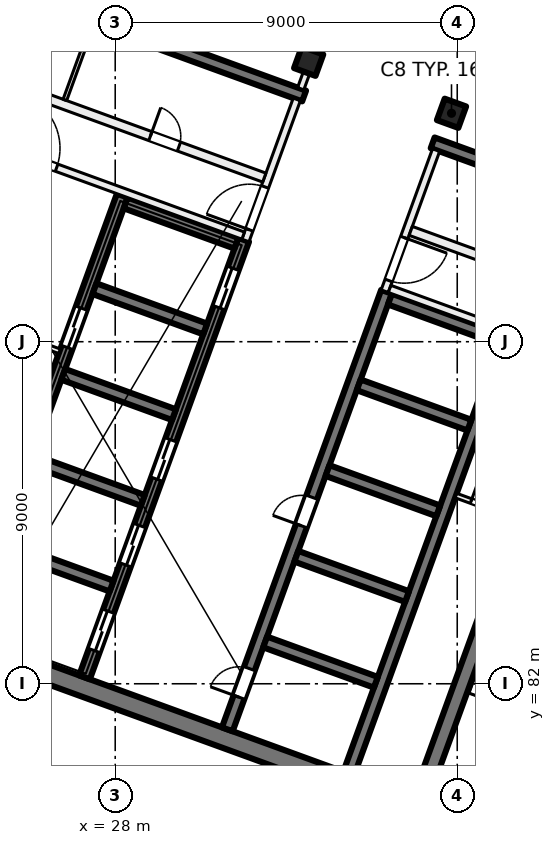
"""IFC4 building model, lengths in metres.
Left out: names, types, materials, properties, quantities, classifications, styles, units other than length and angle.
Written with IfcOpenShell. Run it as: python <this file> out.ifc"""

import sys

from ifc_helpers import new_model, si_unit, direction, frame, frame_2d, origin, origin_2d, place, context, subcontext, project, spatial, rectangle, extrude, element, fill, save


model = new_model("IFC4")
c1 = context("Model", 3, precision=1e-05, world=origin(), true_north=direction((0.0, 1.0)))
c2 = subcontext(c1, "Body", "Model", "MODEL_VIEW")
j1 = project(units=[si_unit("LENGTHUNIT", "METRE"), si_unit("PLANEANGLEUNIT", "RADIAN")], contexts=[c1])
p1 = place(None, origin())
s1 = spatial("IfcSite", under=j1, at=p1, CompositionType="ELEMENT")
p2 = place(p1, origin())
s2 = spatial("IfcBuilding", under=s1, at=p2, CompositionType="ELEMENT")
p3 = place(p2, frame((0.0, 0.0, 200.0)))
s3 = spatial("IfcBuildingStorey", under=s2, at=p3, CompositionType="ELEMENT", Elevation=200.0)
for number, where, z_axis, x_axis in (
    (1, (36.849, 97.011, 0.0), (0.0, 0.0, 1.0), (-0.342, -0.94, 0.0)),
    (2, (33.091, 98.379, 0.0), (0.0, 0.0, 1.0), (-0.342, -0.94, 0.0)),
):
    element("IfcColumn", number, at=place(p3, frame(where, z_axis=z_axis, x_axis=x_axis)), inside=s3, PredefinedType="COLUMN", context=c2, shape_type="SweptSolid", body=[
        extrude(rectangle(XDim=0.6, YDim=0.6, at=origin_2d()), origin(), (0.0, 0.0, 1.0), 4.0),
    ])
p4 = place(p3, frame((35.75, 78.788, 0.0), z_axis=(0.0, 0.0, 1.0), x_axis=(-0.939692894512, 0.342019391267, 0.0)))
e3 = element("IfcWall", 3, at=p4, inside=s3, PredefinedType="SHEAR", context=c2, shape_type="SweptSolid", body=[
    extrude(rectangle(XDim=14.4, YDim=0.5, at=frame_2d((7.2, 0.0))), origin(), (0.0, 0.0, 1.0), 4.0),
])
p5 = place(p3, frame((36.058, 79.048, 0.0), z_axis=(0.0, 0.0, 1.0), x_axis=(0.342016982193, 0.939693771338, 0.0)))
e4 = element("IfcWall", 4, at=p5, inside=s3, PredefinedType="SHEAR", context=c2, shape_type="SweptSolid", body=[
    extrude(rectangle(XDim=7.8, YDim=0.4, at=frame_2d((3.9, 0.0))), origin(), (0.0, 0.0, 1.0), 4.0),
])
p6 = place(p3, frame((30.949, 80.801, 0.0), z_axis=(0.0, 0.0, 1.0), x_axis=(0.342016684409, 0.939693879721, 0.0)))
e5 = element("IfcWall", 5, at=p6, inside=s3, PredefinedType="SHEAR", context=c2, shape_type="SweptSolid", body=[
    extrude(rectangle(XDim=12.25, YDim=0.3, at=frame_2d((6.125, 0.0))), origin(), (0.0, 0.0, 1.0), 4.0),
])
p7 = place(p6, frame((0.9, 0.0, 0.0)))
e6 = element("IfcOpeningElement", 6, at=p7, cuts=e5, PredefinedType="OPENING", context=c2, shape_type="SweptSolid", body=[
    extrude(rectangle(XDim=0.8, YDim=2.1, at=frame_2d((0.4, 1.05))), frame((0.0, 0.16, 0.0), z_axis=(0.0, -1.0, 0.0), x_axis=(1.0, 0.0, 0.0)), (0.0, 0.0, 1.0), 0.32),
])
p8 = place(p6, frame((5.7, 0.0, 0.0)))
e7 = element("IfcOpeningElement", 7, at=p8, cuts=e5, PredefinedType="OPENING", context=c2, shape_type="SweptSolid", body=[
    extrude(rectangle(XDim=0.8, YDim=2.1, at=frame_2d((0.4, 1.05))), frame((0.0, 0.16, 0.0), z_axis=(0.0, -1.0, 0.0), x_axis=(1.0, 0.0, 0.0)), (0.0, 0.0, 1.0), 0.32),
])
p9 = place(p3, frame((34.144, 79.638, 0.0), z_axis=(0.0, 0.0, 1.0), x_axis=(0.342016684409, 0.939693879721, 0.0)))
e8 = element("IfcWall", 8, at=p9, inside=s3, PredefinedType="SHEAR", context=c2, shape_type="SweptSolid", body=[
    extrude(rectangle(XDim=12.25, YDim=0.3, at=frame_2d((6.125, 0.0))), origin(), (0.0, 0.0, 1.0), 4.0),
])
p10 = place(p3, frame((34.858, 82.039, 0.0), z_axis=(0.0, 0.0, 1.0), x_axis=(-0.939689908313, 0.342027595692, 0.0)))
e9 = element("IfcWall", 9, at=p10, inside=s3, PredefinedType="SHEAR", context=c2, shape_type="SweptSolid", body=[
    extrude(rectangle(XDim=3.1, YDim=0.3, at=frame_2d((1.55, 0.0))), origin(), (0.0, 0.0, 1.0), 4.0),
])
p11 = place(p3, frame((35.679, 84.294, 0.0), z_axis=(0.0, 0.0, 1.0), x_axis=(-0.939706007505, 0.341983361377, 0.0)))
e10 = element("IfcWall", 10, at=p11, inside=s3, PredefinedType="SHEAR", context=c2, shape_type="SweptSolid", body=[
    extrude(rectangle(XDim=3.1, YDim=0.3, at=frame_2d((1.55, 0.0))), origin(), (0.0, 0.0, 1.0), 4.0),
])
for number, where, z_axis, x_axis in (
    (11, (36.5, 86.549, 0.0), (0.0, 0.0, 1.0), (-0.94, 0.342, 0.0)),
    (12, (37.321, 88.805, 0.0), (0.0, 0.0, 1.0), (-0.94, 0.342, 0.0)),
    (13, (38.142, 91.06, 0.0), (0.0, 0.0, 1.0), (-0.94, 0.342, 0.0)),
):
    element("IfcWall", number, at=place(p3, frame(where, z_axis=z_axis, x_axis=x_axis)), inside=s3, PredefinedType="SHEAR", context=c2, shape_type="SweptSolid", body=[
        extrude(rectangle(XDim=3.1, YDim=0.3, at=frame_2d((1.55, 0.0))), origin(), (0.0, 0.0, 1.0), 4.0),
    ])
p12 = place(p3, frame((27.191, 82.169, 0.0), z_axis=(0.0, 0.0, 1.0), x_axis=(0.342016684409, 0.939693879721, 0.0)))
e14 = element("IfcWall", 14, at=p12, inside=s3, PredefinedType="SHEAR", context=c2, shape_type="SweptSolid", body=[
    extrude(rectangle(XDim=12.25, YDim=0.3, at=frame_2d((6.125, 0.0))), origin(), (0.0, 0.0, 1.0), 4.0),
])
p13 = place(p12, frame((0.75, 0.0, 0.0)))
e15 = element("IfcOpeningElement", 15, at=p13, cuts=e14, PredefinedType="OPENING", context=c2, shape_type="SweptSolid", body=[
    extrude(rectangle(XDim=1.1, YDim=2.1, at=frame_2d((0.55, 1.05))), frame((0.0, 0.16, 0.0), z_axis=(0.0, -1.0, 0.0), x_axis=(1.0, 0.0, 0.0)), (0.0, 0.0, 1.0), 0.32),
])
p14 = place(p12, frame((3.15, 0.0, 0.0)))
e16 = element("IfcOpeningElement", 16, at=p14, cuts=e14, PredefinedType="OPENING", context=c2, shape_type="SweptSolid", body=[
    extrude(rectangle(XDim=1.1, YDim=2.1, at=frame_2d((0.55, 1.05))), frame((0.0, 0.16, 0.0), z_axis=(0.0, -1.0, 0.0), x_axis=(1.0, 0.0, 0.0)), (0.0, 0.0, 1.0), 0.32),
])
p15 = place(p12, frame((5.55, 0.0, 0.0)))
e17 = element("IfcOpeningElement", 17, at=p15, cuts=e14, PredefinedType="OPENING", context=c2, shape_type="SweptSolid", body=[
    extrude(rectangle(XDim=1.1, YDim=2.1, at=frame_2d((0.55, 1.05))), frame((0.0, 0.16, 0.0), z_axis=(0.0, -1.0, 0.0), x_axis=(1.0, 0.0, 0.0)), (0.0, 0.0, 1.0), 0.32),
])
p16 = place(p12, frame((10.35, 0.0, 0.0)))
e18 = element("IfcOpeningElement", 18, at=p16, cuts=e14, PredefinedType="OPENING", context=c2, shape_type="SweptSolid", body=[
    extrude(rectangle(XDim=1.1, YDim=2.1, at=frame_2d((0.55, 1.05))), frame((0.0, 0.16, 0.0), z_axis=(0.0, -1.0, 0.0), x_axis=(1.0, 0.0, 0.0)), (0.0, 0.0, 1.0), 0.32),
])
p17 = place(p3, frame((23.996, 83.332, 0.0), z_axis=(0.0, 0.0, 1.0), x_axis=(0.342016684409, 0.939693879721, 0.0)))
e19 = element("IfcWall", 19, at=p17, inside=s3, PredefinedType="SHEAR", context=c2, shape_type="SweptSolid", body=[
    extrude(rectangle(XDim=12.25, YDim=0.3, at=frame_2d((6.125, 0.0))), origin(), (0.0, 0.0, 1.0), 4.0),
])
p18 = place(p17, frame((8.0, 0.0, 0.0)))
e20 = element("IfcOpeningElement", 20, at=p18, cuts=e19, PredefinedType="OPENING", context=c2, shape_type="SweptSolid", body=[
    extrude(rectangle(XDim=1.1, YDim=2.1, at=frame_2d((0.55, 1.05))), frame((0.0, 0.16, 0.0), z_axis=(0.0, -1.0, 0.0), x_axis=(1.0, 0.0, 0.0)), (0.0, 0.0, 1.0), 0.32),
])
for number, where, z_axis, x_axis in (
    (21, (27.905, 84.57, 0.0), (0.0, 0.0, 1.0), (-0.94, 0.342, 0.0)),
    (22, (28.726, 86.825, 0.0), (0.0, 0.0, 1.0), (-0.94, 0.342, 0.0)),
    (23, (29.546, 89.08, 0.0), (0.0, 0.0, 1.0), (-0.94, 0.342, 0.0)),
):
    element("IfcWall", number, at=place(p3, frame(where, z_axis=z_axis, x_axis=x_axis)), inside=s3, PredefinedType="SHEAR", context=c2, shape_type="SweptSolid", body=[
        extrude(rectangle(XDim=3.1, YDim=0.3, at=frame_2d((1.55, 0.0))), origin(), (0.0, 0.0, 1.0), 4.0),
    ])
for number, where, z_axis, x_axis in (
    (24, (30.367, 91.336, 0.0), (0.0, 0.0, 1.0), (-0.94, 0.342, 0.0)),
    (25, (31.188, 93.591, 0.0), (0.0, 0.0, 1.0), (-0.94, 0.342, 0.0)),
):
    element("IfcWall", number, at=place(p3, frame(where, z_axis=z_axis, x_axis=x_axis)), inside=s3, PredefinedType="SHEAR", context=c2, shape_type="SweptSolid", body=[
        extrude(rectangle(XDim=3.1, YDim=0.3, at=frame_2d((1.55, 0.0))), origin(), (0.0, 0.0, 1.0), 4.0),
    ])
p19 = place(p3, frame((44.529, 93.258, 0.0), z_axis=(0.0, 0.0, 1.0), x_axis=(-0.9396917844, 0.342022441267, 0.0)))
e26 = element("IfcWall", 26, at=p19, inside=s3, PredefinedType="SHEAR", context=c2, shape_type="SweptSolid", body=[
    extrude(rectangle(XDim=8.7, YDim=0.3, at=frame_2d((4.35, 0.0))), origin(), (0.0, 0.0, 1.0), 4.0),
])
p20 = place(p3, frame((32.971, 97.465, 0.0), z_axis=(0.0, 0.0, 1.0), x_axis=(-0.939695066972, 0.34201342241, 0.0)))
e27 = element("IfcWall", 27, at=p20, inside=s3, PredefinedType="SHEAR", context=c2, shape_type="SweptSolid", body=[
    extrude(rectangle(XDim=8.7, YDim=0.3, at=frame_2d((4.35, 0.0))), origin(), (0.0, 0.0, 1.0), 4.0),
])
p21 = place(p3, frame((31.427, 93.663, 0.0), z_axis=(0.0, 0.0, 1.0), x_axis=(0.342030870568, 0.93968871632, 0.0)))
e28 = element("IfcWall", 28, at=p21, inside=s3, PredefinedType="PARTITIONING", context=c2, shape_type="SweptSolid", body=[
    extrude(rectangle(XDim=3.95, YDim=0.2, at=frame_2d((1.975, 0.0))), origin(), (0.0, 0.0, 1.0), 3.625),
])
p22 = place(p21, frame((0.3, 0.0, 0.0)))
e29 = element("IfcOpeningElement", 29, at=p22, cuts=e28, PredefinedType="OPENING", context=c2, shape_type="SweptSolid", body=[
    extrude(rectangle(XDim=1.2, YDim=2.1, at=frame_2d((0.6, 1.05))), frame((0.0, 0.11, 0.0), z_axis=(0.0, -1.0, 0.0), x_axis=(1.0, 0.0, 0.0)), (0.0, 0.0, 1.0), 0.22),
])
p23 = place(p3, frame((23.427, 96.682, 0.0), z_axis=(0.0, 0.0, 1.0), x_axis=(0.939690465531, -0.342026064782, 0.0)))
e30 = element("IfcWall", 30, at=p23, inside=s3, PredefinedType="PARTITIONING", context=c2, shape_type="SweptSolid", body=[
    extrude(rectangle(XDim=8.45, YDim=0.2, at=frame_2d((4.225, 0.0))), origin(), (0.0, 0.0, 1.0), 3.625),
])
p24 = place(p23, frame((1.725, 0.0, 0.0)))
e31 = element("IfcOpeningElement", 31, at=p24, cuts=e30, PredefinedType="OPENING", context=c2, shape_type="SweptSolid", body=[
    extrude(rectangle(XDim=1.5, YDim=2.1, at=frame_2d((0.75, 1.05))), frame((0.0, 0.11, 0.0), z_axis=(0.0, -1.0, 0.0), x_axis=(1.0, 0.0, 0.0)), (0.0, 0.0, 1.0), 0.22),
])
p25 = place(p3, frame((23.983, 98.208, 0.0), z_axis=(0.0, 0.0, 1.0), x_axis=(0.939699751196, -0.342000552051, 0.0)))
e32 = element("IfcWall", 32, at=p25, inside=s3, PredefinedType="PARTITIONING", context=c2, shape_type="SweptSolid", body=[
    extrude(rectangle(XDim=8.45, YDim=0.25, at=frame_2d((4.225, 0.0))), origin(), (0.0, 0.0, 1.0), 3.625),
])
p26 = place(p25, frame((5.26, 0.0, 0.0)))
e33 = element("IfcOpeningElement", 33, at=p26, cuts=e32, PredefinedType="OPENING", context=c2, shape_type="SweptSolid", body=[
    extrude(rectangle(XDim=0.8, YDim=2.1, at=frame_2d((0.4, 1.05))), frame((0.0, 0.135, 0.0), z_axis=(0.0, -1.0, 0.0), x_axis=(1.0, 0.0, 0.0)), (0.0, 0.0, 1.0), 0.27),
])
p27 = place(p25, frame((0.985, 0.0, 0.0)))
e34 = element("IfcOpeningElement", 34, at=p27, cuts=e32, PredefinedType="OPENING", context=c2, shape_type="SweptSolid", body=[
    extrude(rectangle(XDim=0.8, YDim=2.1, at=frame_2d((0.4, 1.05))), frame((0.0, 0.135, 0.0), z_axis=(0.0, -1.0, 0.0), x_axis=(1.0, 0.0, 0.0)), (0.0, 0.0, 1.0), 0.27),
])
p28 = place(p3, frame((24.985, 91.312, 0.0), z_axis=(0.0, 0.0, 1.0), x_axis=(0.939719959755, -0.341945020783, 0.0)))
e35 = element("IfcWall", 35, at=p28, inside=s3, PredefinedType="PARTITIONING", context=c2, shape_type="SweptSolid", body=[
    extrude(rectangle(XDim=1.65, YDim=0.125, at=frame_2d((0.825, 0.0))), origin(), (0.0, 0.0, 1.0), 3.625),
])
p29 = place(p28, frame((0.425, 0.0, 0.0)))
e36 = element("IfcOpeningElement", 36, at=p29, cuts=e35, PredefinedType="OPENING", context=c2, shape_type="SweptSolid", body=[
    extrude(rectangle(XDim=0.8, YDim=2.1, at=frame_2d((0.4, 1.05))), frame((0.0, 0.073, 0.0), z_axis=(0.0, -1.0, 0.0), x_axis=(1.0, 0.0, 0.0)), (0.0, 0.0, 1.0), 0.145),
])
p30 = place(p3, frame((26.676, 97.362, 0.0), z_axis=(0.0, 0.0, 1.0), x_axis=(0.342023078919, 0.939691552312, 0.0)))
e37 = element("IfcWall", 37, at=p30, inside=s3, PredefinedType="PARTITIONING", context=c2, shape_type="SweptSolid", body=[
    extrude(rectangle(XDim=2.1, YDim=0.1, at=frame_2d((1.05, 0.0))), origin(), (0.0, 0.0, 1.0), 3.625),
])
p31 = place(p3, frame((36.443, 96.041, 0.0), z_axis=(0.0, 0.0, 1.0), x_axis=(-0.341996156931, -0.939701350773, 0.0)))
e38 = element("IfcWall", 38, at=p31, inside=s3, PredefinedType="PARTITIONING", context=c2, shape_type="SweptSolid", body=[
    extrude(rectangle(XDim=3.95, YDim=0.2, at=frame_2d((1.975, 0.0))), origin(), (0.0, 0.0, 1.0), 3.625),
])
p32 = place(p31, frame((2.45, 0.0, 0.0)))
e39 = element("IfcOpeningElement", 39, at=p32, cuts=e38, PredefinedType="OPENING", context=c2, shape_type="SweptSolid", body=[
    extrude(rectangle(XDim=1.2, YDim=2.1, at=frame_2d((0.6, 1.05))), frame((0.0, 0.11, 0.0), z_axis=(0.0, -1.0, 0.0), x_axis=(1.0, 0.0, 0.0)), (0.0, 0.0, 1.0), 0.22),
])
p33 = place(p3, frame((35.22, 92.389, 0.0), z_axis=(0.0, 0.0, 1.0), x_axis=(0.939690465531, -0.342026064782, 0.0)))
e40 = element("IfcWall", 40, at=p33, inside=s3, PredefinedType="PARTITIONING", context=c2, shape_type="SweptSolid", body=[
    extrude(rectangle(XDim=8.45, YDim=0.2, at=frame_2d((4.225, 0.0))), origin(), (0.0, 0.0, 1.0), 3.625),
])
p34 = place(p33, frame((5.225, 0.0, 0.0)))
e41 = element("IfcOpeningElement", 41, at=p34, cuts=e40, PredefinedType="OPENING", context=c2, shape_type="SweptSolid", body=[
    extrude(rectangle(XDim=1.5, YDim=2.1, at=frame_2d((0.75, 1.05))), frame((0.0, 0.11, 0.0), z_axis=(0.0, -1.0, 0.0), x_axis=(1.0, 0.0, 0.0)), (0.0, 0.0, 1.0), 0.22),
])
p35 = place(p3, frame((35.776, 93.916, 0.0), z_axis=(0.0, 0.0, 1.0), x_axis=(0.939690465531, -0.342026064782, 0.0)))
e42 = element("IfcWall", 42, at=p35, inside=s3, PredefinedType="PARTITIONING", context=c2, shape_type="SweptSolid", body=[
    extrude(rectangle(XDim=8.45, YDim=0.25, at=frame_2d((4.225, 0.0))), origin(), (0.0, 0.0, 1.0), 3.625),
])
p36 = place(p35, frame((2.39, 0.0, 0.0)))
e43 = element("IfcOpeningElement", 43, at=p36, cuts=e42, PredefinedType="OPENING", context=c2, shape_type="SweptSolid", body=[
    extrude(rectangle(XDim=0.8, YDim=2.1, at=frame_2d((0.4, 1.05))), frame((0.0, 0.135, 0.0), z_axis=(0.0, -1.0, 0.0), x_axis=(1.0, 0.0, 0.0)), (0.0, 0.0, 1.0), 0.27),
])
p37 = place(p35, frame((6.665, 0.0, 0.0)))
e44 = element("IfcOpeningElement", 44, at=p37, cuts=e42, PredefinedType="OPENING", context=c2, shape_type="SweptSolid", body=[
    extrude(rectangle(XDim=0.8, YDim=2.1, at=frame_2d((0.4, 1.05))), frame((0.0, 0.135, 0.0), z_axis=(0.0, -1.0, 0.0), x_axis=(1.0, 0.0, 0.0)), (0.0, 0.0, 1.0), 0.27),
])
p38 = place(p3, frame((36.966, 86.952, 0.0), z_axis=(0.0, 0.0, 1.0), x_axis=(0.939672407396, -0.342075674051, 0.0)))
e45 = element("IfcWall", 45, at=p38, inside=s3, PredefinedType="PARTITIONING", context=c2, shape_type="SweptSolid", body=[
    extrude(rectangle(XDim=1.65, YDim=0.125, at=frame_2d((0.825, 0.0))), origin(), (0.0, 0.0, 1.0), 3.625),
])
p39 = place(p38, frame((0.425, 0.0, 0.0)))
e46 = element("IfcOpeningElement", 46, at=p39, cuts=e45, PredefinedType="OPENING", context=c2, shape_type="SweptSolid", body=[
    extrude(rectangle(XDim=0.8, YDim=2.1, at=frame_2d((0.4, 1.05))), frame((0.0, 0.073, 0.0), z_axis=(0.0, -1.0, 0.0), x_axis=(1.0, 0.0, 0.0)), (0.0, 0.0, 1.0), 0.145),
])
p40 = place(p3, frame((32.881, 97.657, 0.0), z_axis=(0.0, 0.0, 1.0), x_axis=(0.342058204353, 0.939678766832, 0.0)))
e47 = element("IfcWall", 47, at=p40, inside=s3, PredefinedType="PARTITIONING", context=c2, shape_type="SweptSolid", body=[
    extrude(rectangle(XDim=5.163, YDim=0.175, at=frame_2d((2.581, 0.0))), origin(), (0.0, 0.0, 1.0), 3.625),
])
p41 = place(p40, frame((1.991, 0.0, 0.0)))
e48 = element("IfcOpeningElement", 48, at=p41, cuts=e47, PredefinedType="OPENING", context=c2, shape_type="SweptSolid", body=[
    extrude(rectangle(XDim=1.2, YDim=2.1, at=frame_2d((0.6, 1.05))), frame((0.0, 0.097, 0.0), z_axis=(0.0, -1.0, 0.0), x_axis=(1.0, 0.0, 0.0)), (0.0, 0.0, 1.0), 0.195),
])
p42 = place(p13, origin())
e49 = element("IfcDoor", 49, at=p42, inside=s3, OperationType="DOUBLE_DOOR_SLIDING", PredefinedType="DOOR", context=c2, shape_type="SweptSolid", body=[
    extrude(rectangle(XDim=1.1, YDim=2.1, at=frame_2d((0.55, 1.05))), frame((0.0, 0.025, 0.0), z_axis=(0.0, -1.0, 0.0), x_axis=(1.0, 0.0, 0.0)), (0.0, 0.0, 1.0), 0.05),
])
fill(e15, e49)
p43 = place(p14, origin())
e50 = element("IfcDoor", 50, at=p43, inside=s3, OperationType="DOUBLE_DOOR_SLIDING", PredefinedType="DOOR", context=c2, shape_type="SweptSolid", body=[
    extrude(rectangle(XDim=1.1, YDim=2.1, at=frame_2d((0.55, 1.05))), frame((0.0, 0.025, 0.0), z_axis=(0.0, -1.0, 0.0), x_axis=(1.0, 0.0, 0.0)), (0.0, 0.0, 1.0), 0.05),
])
fill(e16, e50)
p44 = place(p15, origin())
e51 = element("IfcDoor", 51, at=p44, inside=s3, OperationType="DOUBLE_DOOR_SLIDING", PredefinedType="DOOR", context=c2, shape_type="SweptSolid", body=[
    extrude(rectangle(XDim=1.1, YDim=2.1, at=frame_2d((0.55, 1.05))), frame((0.0, 0.025, 0.0), z_axis=(0.0, -1.0, 0.0), x_axis=(1.0, 0.0, 0.0)), (0.0, 0.0, 1.0), 0.05),
])
fill(e17, e51)
p45 = place(p16, origin())
e52 = element("IfcDoor", 52, at=p45, inside=s3, OperationType="DOUBLE_DOOR_SLIDING", PredefinedType="DOOR", context=c2, shape_type="SweptSolid", body=[
    extrude(rectangle(XDim=1.1, YDim=2.1, at=frame_2d((0.55, 1.05))), frame((0.0, 0.025, 0.0), z_axis=(0.0, -1.0, 0.0), x_axis=(1.0, 0.0, 0.0)), (0.0, 0.0, 1.0), 0.05),
])
fill(e18, e52)
p46 = place(p7, origin())
e53 = element("IfcDoor", 53, at=p46, inside=s3, OperationType="SINGLE_SWING_LEFT", PredefinedType="DOOR", context=c2, shape_type="SweptSolid", body=[
    extrude(rectangle(XDim=0.8, YDim=2.1, at=frame_2d((0.4, 1.05))), frame((0.0, 0.025, 0.0), z_axis=(0.0, -1.0, 0.0), x_axis=(1.0, 0.0, 0.0)), (0.0, 0.0, 1.0), 0.05),
])
fill(e6, e53)
p47 = place(p8, origin())
e54 = element("IfcDoor", 54, at=p47, inside=s3, OperationType="SINGLE_SWING_RIGHT", PredefinedType="DOOR", context=c2, shape_type="SweptSolid", body=[
    extrude(rectangle(XDim=0.8, YDim=2.1, at=frame_2d((0.4, 1.05))), frame((0.0, 0.025, 0.0), z_axis=(0.0, -1.0, 0.0), x_axis=(1.0, 0.0, 0.0)), (0.0, 0.0, 1.0), 0.05),
])
fill(e7, e54)
p48 = place(p22, origin())
e55 = element("IfcDoor", 55, at=p48, inside=s3, OperationType="DOUBLE_DOOR_SINGLE_SWING", PredefinedType="DOOR", context=c2, shape_type="SweptSolid", body=[
    extrude(rectangle(XDim=1.2, YDim=2.1, at=frame_2d((0.6, 1.05))), frame((0.0, 0.025, 0.0), z_axis=(0.0, -1.0, 0.0), x_axis=(1.0, 0.0, 0.0)), (0.0, 0.0, 1.0), 0.05),
])
fill(e29, e55)
p49 = place(p24, origin())
e56 = element("IfcDoor", 56, at=p49, inside=s3, OperationType="DOUBLE_DOOR_SINGLE_SWING", PredefinedType="DOOR", context=c2, shape_type="SweptSolid", body=[
    extrude(rectangle(XDim=1.5, YDim=2.1, at=frame_2d((0.75, 1.05))), frame((0.0, 0.025, 0.0), z_axis=(0.0, -1.0, 0.0), x_axis=(1.0, 0.0, 0.0)), (0.0, 0.0, 1.0), 0.05),
])
fill(e31, e56)
p50 = place(p26, origin())
e57 = element("IfcDoor", 57, at=p50, inside=s3, OperationType="SINGLE_SWING_LEFT", PredefinedType="DOOR", context=c2, shape_type="SweptSolid", body=[
    extrude(rectangle(XDim=0.8, YDim=2.1, at=frame_2d((0.4, 1.05))), frame((0.0, 0.025, 0.0), z_axis=(0.0, -1.0, 0.0), x_axis=(1.0, 0.0, 0.0)), (0.0, 0.0, 1.0), 0.05),
])
fill(e33, e57)
p51 = place(p32, origin())
e58 = element("IfcDoor", 58, at=p51, inside=s3, OperationType="DOUBLE_DOOR_SINGLE_SWING", PredefinedType="DOOR", context=c2, shape_type="SweptSolid", body=[
    extrude(rectangle(XDim=1.2, YDim=2.1, at=frame_2d((0.6, 1.05))), frame((0.0, 0.025, 0.0), z_axis=(0.0, -1.0, 0.0), x_axis=(1.0, 0.0, 0.0)), (0.0, 0.0, 1.0), 0.05),
])
fill(e39, e58)
p52 = place(p39, origin())
e59 = element("IfcDoor", 59, at=p52, inside=s3, OperationType="SINGLE_SWING_LEFT", PredefinedType="DOOR", context=c2, shape_type="SweptSolid", body=[
    extrude(rectangle(XDim=0.8, YDim=2.1, at=frame_2d((0.4, 1.05))), frame((0.0, 0.025, 0.0), z_axis=(0.0, -1.0, 0.0), x_axis=(1.0, 0.0, 0.0)), (0.0, 0.0, 1.0), 0.05),
])
fill(e46, e59)
p53 = place(p18, origin())
e60 = element("IfcDoor", 60, at=p53, inside=s3, OperationType="DOUBLE_DOOR_SLIDING", PredefinedType="DOOR", context=c2, shape_type="SweptSolid", body=[
    extrude(rectangle(XDim=1.1, YDim=2.1, at=frame_2d((0.55, 1.05))), frame((0.0, 0.025, 0.0), z_axis=(0.0, -1.0, 0.0), x_axis=(1.0, 0.0, 0.0)), (0.0, 0.0, 1.0), 0.05),
])
fill(e20, e60)
save(model, sys.argv[1])
